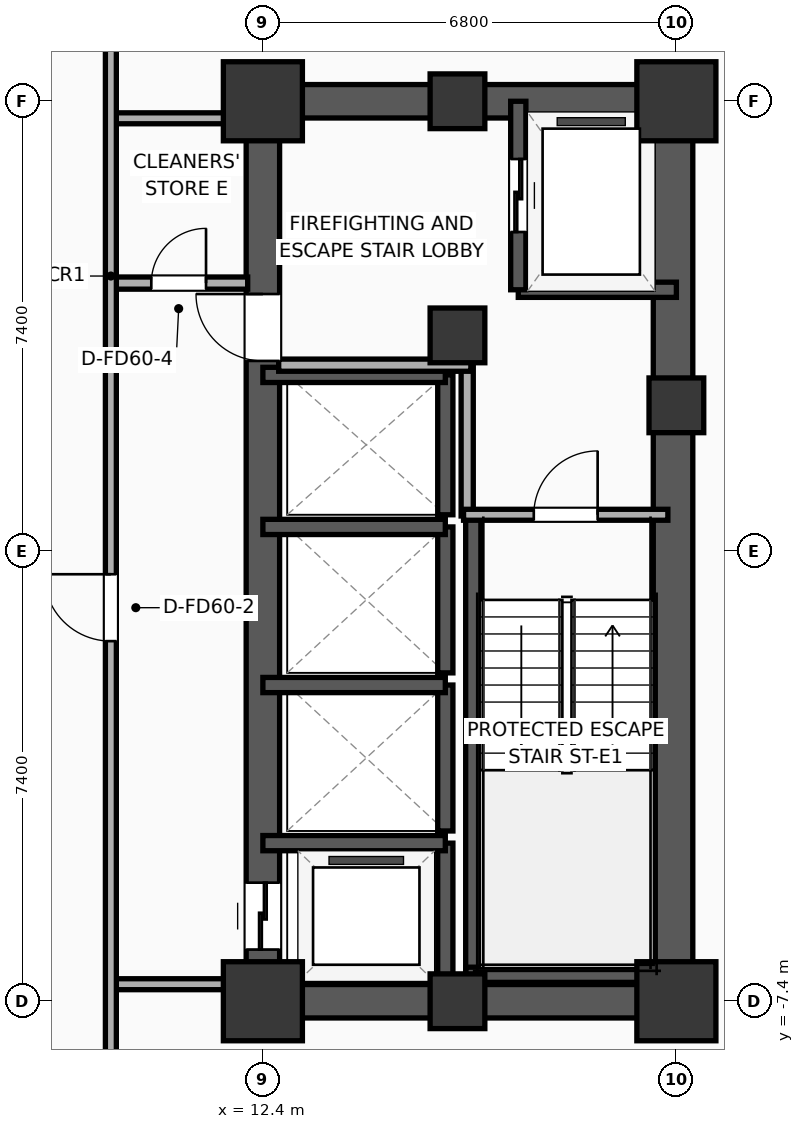
"""IFC4 building model, lengths in metres.
Left out: names, types, materials, properties, quantities, classifications, styles, units other than length and angle.
Written with IfcOpenShell. Run it as: python <this file> out.ifc"""

import sys

from ifc_helpers import new_model, si_unit, direction, frame, frame_2d, origin, origin_2d, place, context, subcontext, project, spatial, rectangle, extrude, element, fill, save


model = new_model("IFC4")
c1 = context("Model", 3, precision=1e-05, world=origin(), true_north=direction((0.0, 1.0)))
c2 = subcontext(c1, "Body", "Model", "MODEL_VIEW")
j1 = project(units=[si_unit("LENGTHUNIT", "METRE"), si_unit("PLANEANGLEUNIT", "RADIAN")], contexts=[c1])
p1 = place(None, origin())
s1 = spatial("IfcSite", under=j1, at=p1, CompositionType="ELEMENT")
p2 = place(p1, origin())
s2 = spatial("IfcBuilding", under=s1, at=p2, CompositionType="ELEMENT")
p3 = place(p2, frame((0.0, 0.0, 132.6)))
s3 = spatial("IfcBuildingStorey", under=s2, at=p3, CompositionType="ELEMENT", Elevation=132.6)
p4 = place(p3, frame((12.4, -7.4, 0.0), z_axis=(0.0, 0.0, 1.0), x_axis=(1.0, 0.0, 0.0)))
e1 = element("IfcColumn", 1, at=p4, inside=s3, PredefinedType="COLUMN", context=c2, shape_type="SweptSolid", body=[
    extrude(rectangle(XDim=1.3, YDim=1.3, at=origin_2d()), origin(), (0.0, 0.0, 1.0), 3.9),
])
p5 = place(p3, frame((15.6, 3.55, 0.0), z_axis=(0.0, 0.0, 1.0), x_axis=(1.0, 0.0, 0.0)))
e2 = element("IfcColumn", 2, at=p5, inside=s3, PredefinedType="COLUMN", context=c2, shape_type="SweptSolid", body=[
    extrude(rectangle(XDim=0.9, YDim=0.9, at=origin_2d()), origin(), (0.0, 0.0, 1.0), 3.9),
])
p6 = place(p3, frame((12.4, 7.4, 0.0), z_axis=(0.0, 0.0, 1.0), x_axis=(1.0, 0.0, 0.0)))
e3 = element("IfcColumn", 3, at=p6, inside=s3, PredefinedType="COLUMN", context=c2, shape_type="SweptSolid", body=[
    extrude(rectangle(XDim=1.3, YDim=1.3, at=origin_2d()), origin(), (0.0, 0.0, 1.0), 3.9),
])
for number, where, z_axis, x_axis in (
    (4, (15.6, -7.4, 0.0), (0.0, 0.0, 1.0), (1.0, 0.0, 0.0)),
    (5, (15.6, 7.4, 0.0), (0.0, 0.0, 1.0), (1.0, 0.0, 0.0)),
):
    element("IfcColumn", number, at=place(p3, frame(where, z_axis=z_axis, x_axis=x_axis)), inside=s3, PredefinedType="COLUMN", context=c2, shape_type="SweptSolid", body=[
        extrude(rectangle(XDim=0.9, YDim=0.9, at=origin_2d()), origin(), (0.0, 0.0, 1.0), 3.9),
    ])
p7 = place(p3, frame((19.2, -7.4, 0.0), z_axis=(0.0, 0.0, 1.0), x_axis=(1.0, 0.0, 0.0)))
e6 = element("IfcColumn", 6, at=p7, inside=s3, PredefinedType="COLUMN", context=c2, shape_type="SweptSolid", body=[
    extrude(rectangle(XDim=1.3, YDim=1.3, at=origin_2d()), origin(), (0.0, 0.0, 1.0), 3.9),
])
p8 = place(p3, frame((19.2, 2.4, 0.0), z_axis=(0.0, 0.0, 1.0), x_axis=(1.0, 0.0, 0.0)))
e7 = element("IfcColumn", 7, at=p8, inside=s3, PredefinedType="COLUMN", context=c2, shape_type="SweptSolid", body=[
    extrude(rectangle(XDim=0.9, YDim=0.9, at=origin_2d()), origin(), (0.0, 0.0, 1.0), 3.9),
])
p9 = place(p3, frame((19.2, 7.4, 0.0), z_axis=(0.0, 0.0, 1.0), x_axis=(1.0, 0.0, 0.0)))
e8 = element("IfcColumn", 8, at=p9, inside=s3, PredefinedType="COLUMN", context=c2, shape_type="SweptSolid", body=[
    extrude(rectangle(XDim=1.3, YDim=1.3, at=origin_2d()), origin(), (0.0, 0.0, 1.0), 3.9),
])
for number, where, z_axis, x_axis in (
    (9, (12.125, -7.4, 0.0), (0.0, 0.0, 1.0), (1.0, 0.0, 0.0)),
    (10, (12.125, 7.4, 0.0), (0.0, 0.0, 1.0), (1.0, 0.0, 0.0)),
):
    element("IfcWall", number, at=place(p3, frame(where, z_axis=z_axis, x_axis=x_axis)), inside=s3, PredefinedType="SHEAR", context=c2, shape_type="SweptSolid", body=[
        extrude(rectangle(XDim=7.35, YDim=0.55, at=frame_2d((3.675, 0.0))), origin(), (0.0, 0.0, 1.0), 3.65),
    ])
p10 = place(p3, frame((12.4, -7.4, 0.0), z_axis=(0.0, 0.0, 1.0), x_axis=(0.0, 1.0, 0.0)))
e11 = element("IfcWall", 11, at=p10, inside=s3, PredefinedType="SHEAR", context=c2, shape_type="SweptSolid", body=[
    extrude(rectangle(XDim=14.8, YDim=0.55, at=frame_2d((7.4, 0.0))), origin(), (0.0, 0.0, 1.0), 3.65),
])
p11 = place(p10, frame((0.85, 0.0, 0.0)))
e12 = element("IfcOpeningElement", 12, at=p11, cuts=e11, PredefinedType="OPENING", context=c2, shape_type="SweptSolid", body=[
    extrude(rectangle(XDim=1.1, YDim=2.05, at=frame_2d((0.55, 1.025))), frame((0.0, 0.285, 0.0), z_axis=(0.0, -1.0, 0.0), x_axis=(1.0, 0.0, 0.0)), (0.0, 0.0, 1.0), 0.57),
])
p12 = place(p10, frame((10.53, 0.0, 0.0)))
e13 = element("IfcOpeningElement", 13, at=p12, cuts=e11, PredefinedType="OPENING", context=c2, shape_type="SweptSolid", body=[
    extrude(rectangle(XDim=1.1, YDim=2.05, at=frame_2d((0.55, 1.025))), frame((0.0, 0.285, 0.0), z_axis=(0.0, -1.0, 0.0), x_axis=(1.0, 0.0, 0.0)), (0.0, 0.0, 1.0), 0.57),
])
p13 = place(p3, frame((19.145, -7.4, 0.0), z_axis=(0.0, 0.0, 1.0), x_axis=(0.0, 1.0, 0.0)))
e14 = element("IfcWall", 14, at=p13, inside=s3, PredefinedType="SHEAR", context=c2, shape_type="SweptSolid", body=[
    extrude(rectangle(XDim=14.8, YDim=0.65, at=frame_2d((7.4, 0.0))), origin(), (0.0, 0.0, 1.0), 3.65),
])
p14 = place(p3, frame((15.86, -7.085, 0.0), z_axis=(0.0, 0.0, 1.0), x_axis=(0.0, 1.0, 0.0)))
e15 = element("IfcWall", 15, at=p14, inside=s3, PredefinedType="SOLIDWALL", context=c2, shape_type="SweptSolid", body=[
    extrude(rectangle(XDim=7.685, YDim=0.25, at=frame_2d((3.843, 0.0))), origin(), (0.0, 0.0, 1.0), 3.65),
])
p15 = place(p3, frame((15.74, -6.965, 0.0), z_axis=(0.0, 0.0, 1.0), x_axis=(1.0, 0.0, 0.0)))
e16 = element("IfcWall", 16, at=p15, inside=s3, PredefinedType="SOLIDWALL", context=c2, shape_type="SweptSolid", body=[
    extrude(rectangle(XDim=3.46, YDim=0.25, at=frame_2d((1.73, 0.0))), origin(), (0.0, 0.0, 1.0), 3.65),
])
p16 = place(p3, frame((16.6, 4.3, 0.0), z_axis=(0.0, 0.0, 1.0), x_axis=(1.0, 0.0, 0.0)))
e17 = element("IfcWall", 17, at=p16, inside=s3, PredefinedType="SOLIDWALL", context=c2, shape_type="SweptSolid", body=[
    extrude(rectangle(XDim=2.6, YDim=0.25, at=frame_2d((1.3, 0.0))), origin(), (0.0, 0.0, 1.0), 3.65),
])
p17 = place(p3, frame((16.6, 7.4, 0.0), z_axis=(0.0, 0.0, 1.0), x_axis=(0.0, -1.0, 0.0)))
e18 = element("IfcWall", 18, at=p17, inside=s3, PredefinedType="SOLIDWALL", context=c2, shape_type="SweptSolid", body=[
    extrude(rectangle(XDim=3.1, YDim=0.25, at=frame_2d((1.55, 0.0))), origin(), (0.0, 0.0, 1.0), 3.65),
])
p18 = place(p17, frame((0.95, 0.0, 0.0)))
e19 = element("IfcOpeningElement", 19, at=p18, cuts=e18, PredefinedType="OPENING", context=c2, shape_type="SweptSolid", body=[
    extrude(rectangle(XDim=1.2, YDim=2.05, at=frame_2d((0.6, 1.025))), frame((0.0, 0.135, 0.0), z_axis=(0.0, -1.0, 0.0), x_axis=(1.0, 0.0, 0.0)), (0.0, 0.0, 1.0), 0.27),
])
p19 = place(p3, frame((15.4, -7.4, 0.0), z_axis=(0.0, 0.0, 1.0), x_axis=(0.0, 1.0, 0.0)))
e20 = element("IfcWall", 20, at=p19, inside=s3, PredefinedType="SOLIDWALL", context=c2, shape_type="SweptSolid", body=[
    extrude(rectangle(XDim=2.6, YDim=0.25, at=frame_2d((1.3, 0.0))), origin(), (0.0, 0.0, 1.0), 3.65),
])
p20 = place(p3, frame((15.4, -4.8, 0.0), z_axis=(0.0, 0.0, 1.0), x_axis=(-1.0, 0.0, 0.0)))
e21 = element("IfcWall", 21, at=p20, inside=s3, PredefinedType="SOLIDWALL", context=c2, shape_type="SweptSolid", body=[
    extrude(rectangle(XDim=3.0, YDim=0.25, at=frame_2d((1.5, 0.0))), origin(), (0.0, 0.0, 1.0), 3.65),
])
p21 = place(p3, frame((15.4, -4.6, 0.0), z_axis=(0.0, 0.0, 1.0), x_axis=(0.0, 1.0, 0.0)))
e22 = element("IfcWall", 22, at=p21, inside=s3, PredefinedType="SOLIDWALL", context=c2, shape_type="SweptSolid", body=[
    extrude(rectangle(XDim=2.4, YDim=0.25, at=frame_2d((1.2, 0.0))), origin(), (0.0, 0.0, 1.0), 3.65),
])
p22 = place(p3, frame((15.4, -2.2, 0.0), z_axis=(0.0, 0.0, 1.0), x_axis=(-1.0, 0.0, 0.0)))
e23 = element("IfcWall", 23, at=p22, inside=s3, PredefinedType="SOLIDWALL", context=c2, shape_type="SweptSolid", body=[
    extrude(rectangle(XDim=3.0, YDim=0.25, at=frame_2d((1.5, 0.0))), origin(), (0.0, 0.0, 1.0), 3.65),
])
p23 = place(p3, frame((15.4, -2.0, 0.0), z_axis=(0.0, 0.0, 1.0), x_axis=(0.0, 1.0, 0.0)))
e24 = element("IfcWall", 24, at=p23, inside=s3, PredefinedType="SOLIDWALL", context=c2, shape_type="SweptSolid", body=[
    extrude(rectangle(XDim=2.4, YDim=0.25, at=frame_2d((1.2, 0.0))), origin(), (0.0, 0.0, 1.0), 3.65),
])
p24 = place(p3, frame((15.4, 0.4, 0.0), z_axis=(0.0, 0.0, 1.0), x_axis=(-1.0, 0.0, 0.0)))
e25 = element("IfcWall", 25, at=p24, inside=s3, PredefinedType="SOLIDWALL", context=c2, shape_type="SweptSolid", body=[
    extrude(rectangle(XDim=3.0, YDim=0.25, at=frame_2d((1.5, 0.0))), origin(), (0.0, 0.0, 1.0), 3.65),
])
p25 = place(p3, frame((15.4, 0.6, 0.0), z_axis=(0.0, 0.0, 1.0), x_axis=(0.0, 1.0, 0.0)))
e26 = element("IfcWall", 26, at=p25, inside=s3, PredefinedType="SOLIDWALL", context=c2, shape_type="SweptSolid", body=[
    extrude(rectangle(XDim=2.3, YDim=0.25, at=frame_2d((1.15, 0.0))), origin(), (0.0, 0.0, 1.0), 3.65),
])
p26 = place(p3, frame((15.4, 2.9, 0.0), z_axis=(0.0, 0.0, 1.0), x_axis=(-1.0, 0.0, 0.0)))
e27 = element("IfcWall", 27, at=p26, inside=s3, PredefinedType="SOLIDWALL", context=c2, shape_type="SweptSolid", body=[
    extrude(rectangle(XDim=3.0, YDim=0.25, at=frame_2d((1.5, 0.0))), origin(), (0.0, 0.0, 1.0), 3.65),
])
p27 = place(p3, frame((15.76, 0.58, 0.0), z_axis=(0.0, 0.0, 1.0), x_axis=(0.0, 1.0, 0.0)))
e28 = element("IfcWall", 28, at=p27, inside=s3, PredefinedType="PARTITIONING", context=c2, shape_type="SweptSolid", body=[
    extrude(rectangle(XDim=2.52, YDim=0.2, at=frame_2d((1.26, 0.0))), origin(), (0.0, 0.0, 1.0), 3.65),
])
p28 = place(p3, frame((12.66, 3.06, 0.0), z_axis=(0.0, 0.0, 1.0), x_axis=(1.0, 0.0, 0.0)))
e29 = element("IfcWall", 29, at=p28, inside=s3, PredefinedType="PARTITIONING", context=c2, shape_type="SweptSolid", body=[
    extrude(rectangle(XDim=3.16, YDim=0.2, at=frame_2d((1.58, 0.0))), origin(), (0.0, 0.0, 1.0), 3.65),
])
p29 = place(p3, frame((15.7, 0.6, 0.0), z_axis=(0.0, 0.0, 1.0), x_axis=(1.0, 0.0, 0.0)))
e30 = element("IfcWall", 30, at=p29, inside=s3, PredefinedType="PARTITIONING", context=c2, shape_type="SweptSolid", body=[
    extrude(rectangle(XDim=3.36, YDim=0.18, at=frame_2d((1.68, 0.0))), origin(), (0.0, 0.0, 1.0), 3.65),
])
p30 = place(p29, frame((1.155, 0.0, 0.0)))
e31 = element("IfcOpeningElement", 31, at=p30, cuts=e30, PredefinedType="OPENING", context=c2, shape_type="SweptSolid", body=[
    extrude(rectangle(XDim=1.05, YDim=2.05, at=frame_2d((0.525, 1.025))), frame((0.0, 0.1, 0.0), z_axis=(0.0, -1.0, 0.0), x_axis=(1.0, 0.0, 0.0)), (0.0, 0.0, 1.0), 0.2),
])
p31 = place(p3, frame((9.88, 4.41, 0.0), z_axis=(0.0, 0.0, 1.0), x_axis=(1.0, 0.0, 0.0)))
e32 = element("IfcWall", 32, at=p31, inside=s3, PredefinedType="PARTITIONING", context=c2, shape_type="SweptSolid", body=[
    extrude(rectangle(XDim=2.27, YDim=0.2, at=frame_2d((1.135, 0.0))), origin(), (0.0, 0.0, 1.0), 3.65),
])
p32 = place(p31, frame((0.685, 0.0, 0.0)))
e33 = element("IfcOpeningElement", 33, at=p32, cuts=e32, PredefinedType="OPENING", context=c2, shape_type="SweptSolid", body=[
    extrude(rectangle(XDim=0.9, YDim=2.05, at=frame_2d((0.45, 1.025))), frame((0.0, 0.11, 0.0), z_axis=(0.0, -1.0, 0.0), x_axis=(1.0, 0.0, 0.0)), (0.0, 0.0, 1.0), 0.22),
])
for number, where, z_axis, x_axis in (
    (34, (9.88, 7.12, 0.0), (0.0, 0.0, 1.0), (1.0, 0.0, 0.0)),
    (35, (9.88, -7.12, 0.0), (0.0, 0.0, 1.0), (1.0, 0.0, 0.0)),
):
    element("IfcWall", number, at=place(p3, frame(where, z_axis=z_axis, x_axis=x_axis)), inside=s3, PredefinedType="PARTITIONING", context=c2, shape_type="SweptSolid", body=[
        extrude(rectangle(XDim=2.27, YDim=0.18, at=frame_2d((1.135, 0.0))), origin(), (0.0, 0.0, 1.0), 3.65),
    ])
p33 = place(p3, frame((9.9, -9.28, 0.0), z_axis=(0.0, 0.0, 1.0), x_axis=(0.0, 1.0, 0.0)))
e36 = element("IfcWall", 36, at=p33, inside=s3, PredefinedType="PARTITIONING", context=c2, shape_type="SweptSolid", body=[
    extrude(rectangle(XDim=18.56, YDim=0.18, at=frame_2d((9.28, 0.0))), origin(), (0.0, 0.0, 1.0), 3.65),
])
p34 = place(p33, frame((7.802, 0.0, 0.0)))
e37 = element("IfcOpeningElement", 37, at=p34, cuts=e36, PredefinedType="OPENING", context=c2, shape_type="SweptSolid", body=[
    extrude(rectangle(XDim=1.1, YDim=2.05, at=frame_2d((0.55, 1.025))), frame((0.0, 0.1, 0.0), z_axis=(0.0, -1.0, 0.0), x_axis=(1.0, 0.0, 0.0)), (0.0, 0.0, 1.0), 0.2),
])
p35 = place(p18, origin())
e38 = element("IfcDoor", 38, at=p35, inside=s3, OperationType="SLIDING_TO_LEFT", PredefinedType="DOOR", context=c2, shape_type="SweptSolid", body=[
    extrude(rectangle(XDim=1.2, YDim=2.05, at=frame_2d((0.6, 1.025))), frame((0.0, 0.025, 0.0), z_axis=(0.0, -1.0, 0.0), x_axis=(1.0, 0.0, 0.0)), (0.0, 0.0, 1.0), 0.05),
])
fill(e19, e38)
p36 = place(p11, origin())
e39 = element("IfcDoor", 39, at=p36, inside=s3, OperationType="SLIDING_TO_LEFT", PredefinedType="DOOR", context=c2, shape_type="SweptSolid", body=[
    extrude(rectangle(XDim=1.1, YDim=2.05, at=frame_2d((0.55, 1.025))), frame((0.0, 0.025, 0.0), z_axis=(0.0, -1.0, 0.0), x_axis=(1.0, 0.0, 0.0)), (0.0, 0.0, 1.0), 0.05),
])
fill(e12, e39)
p37 = place(p30, origin())
e40 = element("IfcDoor", 40, at=p37, inside=s3, OperationType="SINGLE_SWING_RIGHT", PredefinedType="DOOR", context=c2, shape_type="SweptSolid", body=[
    extrude(rectangle(XDim=1.05, YDim=2.05, at=frame_2d((0.525, 1.025))), frame((0.0, 0.025, 0.0), z_axis=(0.0, -1.0, 0.0), x_axis=(1.0, 0.0, 0.0)), (0.0, 0.0, 1.0), 0.05),
])
fill(e31, e40)
p38 = place(p32, origin())
e41 = element("IfcDoor", 41, at=p38, inside=s3, OperationType="SINGLE_SWING_RIGHT", PredefinedType="DOOR", context=c2, shape_type="SweptSolid", body=[
    extrude(rectangle(XDim=0.9, YDim=2.05, at=frame_2d((0.45, 1.025))), frame((0.0, 0.025, 0.0), z_axis=(0.0, -1.0, 0.0), x_axis=(1.0, 0.0, 0.0)), (0.0, 0.0, 1.0), 0.05),
])
fill(e33, e41)
p39 = place(p34, origin())
e42 = element("IfcDoor", 42, at=p39, inside=s3, OperationType="SINGLE_SWING_RIGHT", PredefinedType="DOOR", context=c2, shape_type="SweptSolid", body=[
    extrude(rectangle(XDim=1.1, YDim=2.05, at=frame_2d((0.55, 1.025))), frame((0.0, 0.025, 0.0), z_axis=(0.0, -1.0, 0.0), x_axis=(1.0, 0.0, 0.0)), (0.0, 0.0, 1.0), 0.05),
])
fill(e37, e42)
p40 = place(p12, origin())
e43 = element("IfcDoor", 43, at=p40, inside=s3, OperationType="SINGLE_SWING_RIGHT", PredefinedType="DOOR", context=c2, shape_type="SweptSolid", body=[
    extrude(rectangle(XDim=1.1, YDim=2.05, at=frame_2d((0.55, 1.025))), frame((0.0, 0.025, 0.0), z_axis=(0.0, -1.0, 0.0), x_axis=(1.0, 0.0, 0.0)), (0.0, 0.0, 1.0), 0.05),
])
fill(e13, e43)
save(model, sys.argv[1])
